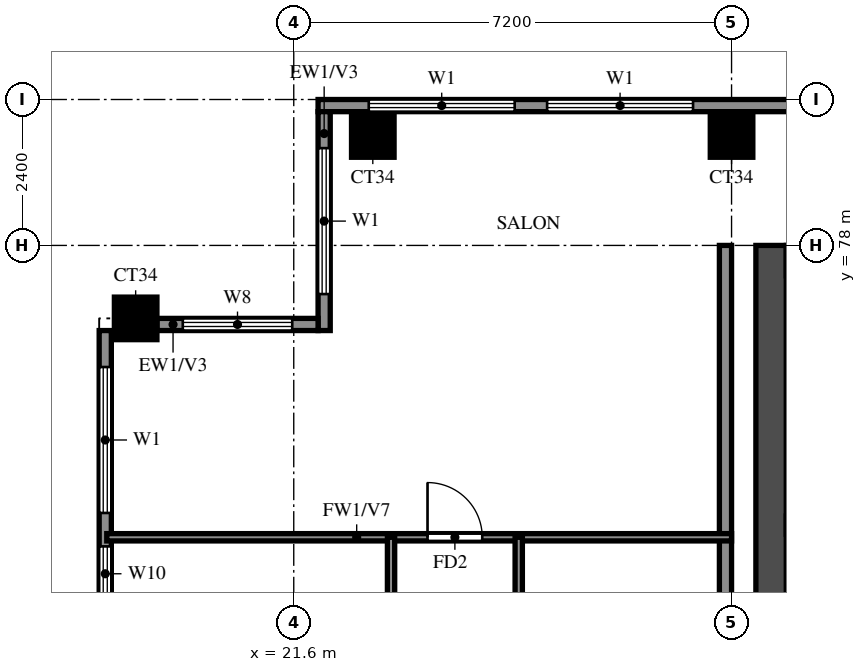
"""IFC4 building model, lengths in metres.
Left out: names, types, materials, properties, quantities, classifications, styles, units other than length and angle.
Written with IfcOpenShell. Run it as: python <this file> out.ifc"""

import sys

from ifc_helpers import new_model, si_unit, direction, frame, frame_2d, origin, origin_2d, place, context, subcontext, project, spatial, rectangle, extrude, source, transform, mapped, element, fill, save


model = new_model("IFC4")
c1 = context("Model", 3, precision=1e-05, world=origin(), true_north=direction((0.0, 1.0)))
c2 = subcontext(c1, "Body", "Model", "MODEL_VIEW")
j1 = project(units=[si_unit("LENGTHUNIT", "METRE"), si_unit("PLANEANGLEUNIT", "RADIAN")], contexts=[c1])
p1 = place(None, origin())
s1 = spatial("IfcSite", under=j1, at=p1, CompositionType="ELEMENT")
p2 = place(p1, origin())
s2 = spatial("IfcBuilding", under=s1, at=p2, CompositionType="ELEMENT")
p3 = place(p2, frame((0.0, 0.0, 222.0)))
s3 = spatial("IfcBuildingStorey", under=s2, at=p3, CompositionType="ELEMENT", Elevation=222.0)
m1 = source(origin(), c2, "Body", "SweptSolid", [
    extrude(rectangle(XDim=0.7, YDim=0.7, at=origin_2d()), origin(), (0.0, 0.0, 1.0), 3.22),
])
for number, where, z_axis, x_axis in (
    (1, (19.0, 76.8, 0.0), (0.0, 0.0, 1.0), (1.0, 0.0, 0.0)),
    (2, (22.9, 79.8, 0.0), (0.0, 0.0, 1.0), (1.0, 0.0, 0.0)),
    (3, (28.8, 79.8, 0.0), (0.0, 0.0, 1.0), (1.0, 0.0, 0.0)),
):
    element("IfcColumn", number, at=place(p3, frame(where, z_axis=z_axis, x_axis=x_axis)), inside=s3, PredefinedType="COLUMN", context=c2, shape_type="MappedRepresentation", body=[
        mapped(m1, transform((0.0, 0.0, 0.0))),
    ])
p4 = place(p3, frame((29.45, 66.15, 0.0), z_axis=(0.0, 0.0, 1.0), x_axis=(0.0, 1.0, 0.0)))
e4 = element("IfcWall", 4, at=p4, inside=s3, PredefinedType="SHEAR", context=c2, shape_type="SweptSolid", body=[
    extrude(rectangle(XDim=11.85, YDim=0.5, at=frame_2d((5.925, 0.0))), origin(), (0.0, 0.0, 1.0), 3.22),
])
p5 = place(p3, frame((78.6, 80.3, 0.0), z_axis=(0.0, 0.0, 1.0), x_axis=(-1.0, 0.0, 0.0)))
e5 = element("IfcWall", 5, at=p5, inside=s3, PredefinedType="SOLIDWALL", context=c2, shape_type="SweptSolid", body=[
    extrude(rectangle(XDim=56.6, YDim=0.2, at=frame_2d((28.3, 0.0))), origin(), (0.0, 0.0, 1.0), 3.22),
])
p6 = place(p5, frame((50.433, 0.0, 0.6)))
e6 = element("IfcOpeningElement", 6, at=p6, cuts=e5, PredefinedType="OPENING", context=c2, shape_type="SweptSolid", body=[
    extrude(rectangle(XDim=2.4, YDim=2.4, at=frame_2d((1.2, 1.2))), frame((0.0, 0.11, 0.0), z_axis=(0.0, -1.0, 0.0), x_axis=(1.0, 0.0, 0.0)), (0.0, 0.0, 1.0), 0.22),
])
p7 = place(p5, frame((53.367, 0.0, 0.6)))
e7 = element("IfcOpeningElement", 7, at=p7, cuts=e5, PredefinedType="OPENING", context=c2, shape_type="SweptSolid", body=[
    extrude(rectangle(XDim=2.4, YDim=2.4, at=frame_2d((1.2, 1.2))), frame((0.0, 0.11, 0.0), z_axis=(0.0, -1.0, 0.0), x_axis=(1.0, 0.0, 0.0)), (0.0, 0.0, 1.0), 0.22),
])
p8 = place(p5, frame((0.767, 0.0, 0.6)))
e8 = element("IfcOpeningElement", 8, at=p8, cuts=e5, PredefinedType="OPENING", context=c2, shape_type="SweptSolid", body=[
    extrude(rectangle(XDim=2.4, YDim=2.4, at=frame_2d((1.2, 1.2))), frame((0.0, 0.11, 0.0), z_axis=(0.0, -1.0, 0.0), x_axis=(1.0, 0.0, 0.0)), (0.0, 0.0, 1.0), 0.22),
])
p9 = place(p5, frame((3.633, 0.0, 0.6)))
e9 = element("IfcOpeningElement", 9, at=p9, cuts=e5, PredefinedType="OPENING", context=c2, shape_type="SweptSolid", body=[
    extrude(rectangle(XDim=2.4, YDim=2.4, at=frame_2d((1.2, 1.2))), frame((0.0, 0.11, 0.0), z_axis=(0.0, -1.0, 0.0), x_axis=(1.0, 0.0, 0.0)), (0.0, 0.0, 1.0), 0.22),
])
p10 = place(p3, frame((22.1, 80.2, 0.0), z_axis=(0.0, 0.0, 1.0), x_axis=(0.0, -1.0, 0.0)))
e10 = element("IfcWall", 10, at=p10, inside=s3, PredefinedType="SOLIDWALL", context=c2, shape_type="SweptSolid", body=[
    extrude(rectangle(XDim=3.6, YDim=0.2, at=frame_2d((1.8, 0.0))), origin(), (0.0, 0.0, 1.0), 3.22),
])
p11 = place(p10, frame((0.6, 0.0, 0.6)))
e11 = element("IfcOpeningElement", 11, at=p11, cuts=e10, PredefinedType="OPENING", context=c2, shape_type="SweptSolid", body=[
    extrude(rectangle(XDim=2.4, YDim=2.4, at=frame_2d((1.2, 1.2))), frame((0.0, 0.11, 0.0), z_axis=(0.0, -1.0, 0.0), x_axis=(1.0, 0.0, 0.0)), (0.0, 0.0, 1.0), 0.22),
])
p12 = place(p3, frame((22.0, 76.7, 0.0), z_axis=(0.0, 0.0, 1.0), x_axis=(-1.0, 0.0, 0.0)))
e12 = element("IfcWall", 12, at=p12, inside=s3, PredefinedType="SOLIDWALL", context=c2, shape_type="SweptSolid", body=[
    extrude(rectangle(XDim=2.65, YDim=0.2, at=frame_2d((1.325, 0.0))), origin(), (0.0, 0.0, 1.0), 3.22),
])
p13 = place(p12, frame((0.425, 0.0, 0.6)))
e13 = element("IfcOpeningElement", 13, at=p13, cuts=e12, PredefinedType="OPENING", context=c2, shape_type="SweptSolid", body=[
    extrude(rectangle(XDim=1.8, YDim=2.4, at=frame_2d((0.9, 1.2))), frame((0.0, 0.11, 0.0), z_axis=(0.0, -1.0, 0.0), x_axis=(1.0, 0.0, 0.0)), (0.0, 0.0, 1.0), 0.22),
])
p14 = place(p3, frame((18.5, 76.6, 0.0), z_axis=(0.0, 0.0, 1.0), x_axis=(0.0, -1.0, 0.0)))
e14 = element("IfcWall", 14, at=p14, inside=s3, PredefinedType="SOLIDWALL", context=c2, shape_type="SweptSolid", body=[
    extrude(rectangle(XDim=33.4, YDim=0.2, at=frame_2d((16.7, 0.0))), origin(), (0.0, 0.0, 1.0), 3.22),
])
p15 = place(p14, frame((7.9, 0.0, 0.0)))
e15 = element("IfcOpeningElement", 15, at=p15, cuts=e14, PredefinedType="OPENING", context=c2, shape_type="SweptSolid", body=[
    extrude(rectangle(XDim=1.8, YDim=2.4, at=frame_2d((0.9, 1.2))), frame((0.0, 0.11, 0.0), z_axis=(0.0, -1.0, 0.0), x_axis=(1.0, 0.0, 0.0)), (0.0, 0.0, 1.0), 0.22),
])
p16 = place(p14, frame((22.3, 0.0, 0.0)))
e16 = element("IfcOpeningElement", 16, at=p16, cuts=e14, PredefinedType="OPENING", context=c2, shape_type="SweptSolid", body=[
    extrude(rectangle(XDim=1.8, YDim=2.4, at=frame_2d((0.9, 1.2))), frame((0.0, 0.11, 0.0), z_axis=(0.0, -1.0, 0.0), x_axis=(1.0, 0.0, 0.0)), (0.0, 0.0, 1.0), 0.22),
])
p17 = place(p14, frame((29.7, 0.0, 0.6)))
e17 = element("IfcOpeningElement", 17, at=p17, cuts=e14, PredefinedType="OPENING", context=c2, shape_type="SweptSolid", body=[
    extrude(rectangle(XDim=2.4, YDim=2.4, at=frame_2d((1.2, 1.2))), frame((0.0, 0.11, 0.0), z_axis=(0.0, -1.0, 0.0), x_axis=(1.0, 0.0, 0.0)), (0.0, 0.0, 1.0), 0.22),
])
p18 = place(p14, frame((26.5, 0.0, 0.6)))
e18 = element("IfcOpeningElement", 18, at=p18, cuts=e14, PredefinedType="OPENING", context=c2, shape_type="SweptSolid", body=[
    extrude(rectangle(XDim=1.8, YDim=2.4, at=frame_2d((0.9, 1.2))), frame((0.0, 0.11, 0.0), z_axis=(0.0, -1.0, 0.0), x_axis=(1.0, 0.0, 0.0)), (0.0, 0.0, 1.0), 0.22),
])
p19 = place(p14, frame((15.4, 0.0, 0.6)))
e19 = element("IfcOpeningElement", 19, at=p19, cuts=e14, PredefinedType="OPENING", context=c2, shape_type="SweptSolid", body=[
    extrude(rectangle(XDim=2.4, YDim=2.4, at=frame_2d((1.2, 1.2))), frame((0.0, 0.11, 0.0), z_axis=(0.0, -1.0, 0.0), x_axis=(1.0, 0.0, 0.0)), (0.0, 0.0, 1.0), 0.22),
])
p20 = place(p14, frame((19.9, 0.0, 0.6)))
e20 = element("IfcOpeningElement", 20, at=p20, cuts=e14, PredefinedType="OPENING", context=c2, shape_type="SweptSolid", body=[
    extrude(rectangle(XDim=1.2, YDim=2.4, at=frame_2d((0.6, 1.2))), frame((0.0, 0.11, 0.0), z_axis=(0.0, -1.0, 0.0), x_axis=(1.0, 0.0, 0.0)), (0.0, 0.0, 1.0), 0.22),
])
p21 = place(p14, frame((12.1, 0.0, 0.6)))
e21 = element("IfcOpeningElement", 21, at=p21, cuts=e14, PredefinedType="OPENING", context=c2, shape_type="SweptSolid", body=[
    extrude(rectangle(XDim=1.8, YDim=2.4, at=frame_2d((0.9, 1.2))), frame((0.0, 0.11, 0.0), z_axis=(0.0, -1.0, 0.0), x_axis=(1.0, 0.0, 0.0)), (0.0, 0.0, 1.0), 0.22),
])
p22 = place(p14, frame((3.55, 0.0, 0.6)))
e22 = element("IfcOpeningElement", 22, at=p22, cuts=e14, PredefinedType="OPENING", context=c2, shape_type="SweptSolid", body=[
    extrude(rectangle(XDim=0.9, YDim=2.4, at=frame_2d((0.45, 1.2))), frame((0.0, 0.11, 0.0), z_axis=(0.0, -1.0, 0.0), x_axis=(1.0, 0.0, 0.0)), (0.0, 0.0, 1.0), 0.22),
])
p23 = place(p14, frame((5.5, 0.0, 0.6)))
e23 = element("IfcOpeningElement", 23, at=p23, cuts=e14, PredefinedType="OPENING", context=c2, shape_type="SweptSolid", body=[
    extrude(rectangle(XDim=1.2, YDim=2.4, at=frame_2d((0.6, 1.2))), frame((0.0, 0.11, 0.0), z_axis=(0.0, -1.0, 0.0), x_axis=(1.0, 0.0, 0.0)), (0.0, 0.0, 1.0), 0.22),
])
p24 = place(p14, frame((0.6, 0.0, 0.6)))
e24 = element("IfcOpeningElement", 24, at=p24, cuts=e14, PredefinedType="OPENING", context=c2, shape_type="SweptSolid", body=[
    extrude(rectangle(XDim=2.4, YDim=2.4, at=frame_2d((1.2, 1.2))), frame((0.0, 0.11, 0.0), z_axis=(0.0, -1.0, 0.0), x_axis=(1.0, 0.0, 0.0)), (0.0, 0.0, 1.0), 0.22),
])
p25 = place(p3, frame((28.7, 62.4, 0.0), z_axis=(0.0, 0.0, 1.0), x_axis=(0.0, 1.0, 0.0)))
e25 = element("IfcWall", 25, at=p25, inside=s3, PredefinedType="SOLIDWALL", context=c2, shape_type="SweptSolid", body=[
    extrude(rectangle(XDim=15.6, YDim=0.2, at=frame_2d((7.8, 0.0))), origin(), (0.0, 0.0, 1.0), 3.22),
])
p26 = place(p3, frame((18.525, 73.2, 0.0), z_axis=(0.0, 0.0, 1.0), x_axis=(1.0, 0.0, 0.0)))
e26 = element("IfcWall", 26, at=p26, inside=s3, PredefinedType="PARTITIONING", context=c2, shape_type="SweptSolid", body=[
    extrude(rectangle(XDim=10.275, YDim=0.12, at=frame_2d((5.138, 0.0))), origin(), (0.0, 0.0, 1.0), 2.32),
])
p27 = place(p26, frame((5.275, 0.0, 0.0)))
e27 = element("IfcOpeningElement", 27, at=p27, cuts=e26, PredefinedType="OPENING", context=c2, shape_type="SweptSolid", body=[
    extrude(rectangle(XDim=0.9, YDim=2.1, at=frame_2d((0.45, 1.05))), frame((0.0, 0.07, 0.0), z_axis=(0.0, -1.0, 0.0), x_axis=(1.0, 0.0, 0.0)), (0.0, 0.0, 1.0), 0.14),
])
p28 = place(p3, frame((23.2, 48.0, 0.0), z_axis=(0.0, 0.0, 1.0), x_axis=(0.0, 1.0, 0.0)))
e28 = element("IfcWall", 28, at=p28, inside=s3, PredefinedType="PARTITIONING", context=c2, shape_type="SweptSolid", body=[
    extrude(rectangle(XDim=25.2, YDim=0.12, at=frame_2d((12.6, 0.0))), origin(), (0.0, 0.0, 1.0), 3.22),
])
p29 = place(p28, frame((1.35, 0.0, 0.0)))
e29 = element("IfcOpeningElement", 29, at=p29, cuts=e28, PredefinedType="OPENING", context=c2, shape_type="SweptSolid", body=[
    extrude(rectangle(XDim=0.9, YDim=2.1, at=frame_2d((0.45, 1.05))), frame((0.0, 0.07, 0.0), z_axis=(0.0, -1.0, 0.0), x_axis=(1.0, 0.0, 0.0)), (0.0, 0.0, 1.0), 0.14),
])
p30 = place(p28, frame((4.95, 0.0, 0.0)))
e30 = element("IfcOpeningElement", 30, at=p30, cuts=e28, PredefinedType="OPENING", context=c2, shape_type="SweptSolid", body=[
    extrude(rectangle(XDim=0.9, YDim=2.1, at=frame_2d((0.45, 1.05))), frame((0.0, 0.07, 0.0), z_axis=(0.0, -1.0, 0.0), x_axis=(1.0, 0.0, 0.0)), (0.0, 0.0, 1.0), 0.14),
])
p31 = place(p28, frame((10.05, 0.0, 0.0)))
e31 = element("IfcOpeningElement", 31, at=p31, cuts=e28, PredefinedType="OPENING", context=c2, shape_type="SweptSolid", body=[
    extrude(rectangle(XDim=1.5, YDim=2.1, at=frame_2d((0.75, 1.05))), frame((0.0, 0.07, 0.0), z_axis=(0.0, -1.0, 0.0), x_axis=(1.0, 0.0, 0.0)), (0.0, 0.0, 1.0), 0.14),
])
p32 = place(p28, frame((15.75, 0.0, 0.0)))
e32 = element("IfcOpeningElement", 32, at=p32, cuts=e28, PredefinedType="OPENING", context=c2, shape_type="SweptSolid", body=[
    extrude(rectangle(XDim=0.9, YDim=2.1, at=frame_2d((0.45, 1.05))), frame((0.0, 0.07, 0.0), z_axis=(0.0, -1.0, 0.0), x_axis=(1.0, 0.0, 0.0)), (0.0, 0.0, 1.0), 0.14),
])
p33 = place(p28, frame((19.35, 0.0, 0.0)))
e33 = element("IfcOpeningElement", 33, at=p33, cuts=e28, PredefinedType="OPENING", context=c2, shape_type="SweptSolid", body=[
    extrude(rectangle(XDim=0.9, YDim=2.1, at=frame_2d((0.45, 1.05))), frame((0.0, 0.07, 0.0), z_axis=(0.0, -1.0, 0.0), x_axis=(1.0, 0.0, 0.0)), (0.0, 0.0, 1.0), 0.14),
])
p34 = place(p28, frame((22.95, 0.0, 0.0)))
e34 = element("IfcOpeningElement", 34, at=p34, cuts=e28, PredefinedType="OPENING", context=c2, shape_type="SweptSolid", body=[
    extrude(rectangle(XDim=0.9, YDim=2.1, at=frame_2d((0.45, 1.05))), frame((0.0, 0.07, 0.0), z_axis=(0.0, -1.0, 0.0), x_axis=(1.0, 0.0, 0.0)), (0.0, 0.0, 1.0), 0.14),
])
p35 = place(p3, frame((25.3, 64.8, 0.0), z_axis=(0.0, 0.0, 1.0), x_axis=(0.0, 1.0, 0.0)))
e35 = element("IfcWall", 35, at=p35, inside=s3, PredefinedType="PARTITIONING", context=c2, shape_type="SweptSolid", body=[
    extrude(rectangle(XDim=8.4, YDim=0.12, at=frame_2d((4.2, 0.0))), origin(), (0.0, 0.0, 1.0), 3.22),
])
p36 = place(p35, frame((4.975, 0.0, 0.0)))
e36 = element("IfcOpeningElement", 36, at=p36, cuts=e35, PredefinedType="OPENING", context=c2, shape_type="SweptSolid", body=[
    extrude(rectangle(XDim=0.9, YDim=2.1, at=frame_2d((0.45, 1.05))), frame((0.0, 0.07, 0.0), z_axis=(0.0, -1.0, 0.0), x_axis=(1.0, 0.0, 0.0)), (0.0, 0.0, 1.0), 0.14),
])
p37 = place(p6, origin())
e37 = element("IfcWindow", 37, at=p37, inside=s3, PartitioningType="DOUBLE_PANEL_VERTICAL", PredefinedType="WINDOW", context=c2, shape_type="SweptSolid", body=[
    extrude(rectangle(XDim=2.4, YDim=2.4, at=frame_2d((1.2, 1.2))), frame((0.0, 0.03, 0.0), z_axis=(0.0, -1.0, 0.0), x_axis=(1.0, 0.0, 0.0)), (0.0, 0.0, 1.0), 0.06),
])
fill(e6, e37)
p38 = place(p7, origin())
e38 = element("IfcWindow", 38, at=p38, inside=s3, PartitioningType="DOUBLE_PANEL_VERTICAL", PredefinedType="WINDOW", context=c2, shape_type="SweptSolid", body=[
    extrude(rectangle(XDim=2.4, YDim=2.4, at=frame_2d((1.2, 1.2))), frame((0.0, 0.03, 0.0), z_axis=(0.0, -1.0, 0.0), x_axis=(1.0, 0.0, 0.0)), (0.0, 0.0, 1.0), 0.06),
])
fill(e7, e38)
p39 = place(p11, origin())
e39 = element("IfcWindow", 39, at=p39, inside=s3, PartitioningType="DOUBLE_PANEL_VERTICAL", PredefinedType="WINDOW", context=c2, shape_type="SweptSolid", body=[
    extrude(rectangle(XDim=2.4, YDim=2.4, at=frame_2d((1.2, 1.2))), frame((0.0, 0.03, 0.0), z_axis=(0.0, -1.0, 0.0), x_axis=(1.0, 0.0, 0.0)), (0.0, 0.0, 1.0), 0.06),
])
fill(e11, e39)
p40 = place(p13, origin())
e40 = element("IfcWindow", 40, at=p40, inside=s3, PartitioningType="DOUBLE_PANEL_VERTICAL", PredefinedType="WINDOW", context=c2, shape_type="SweptSolid", body=[
    extrude(rectangle(XDim=1.8, YDim=2.4, at=frame_2d((0.9, 1.2))), frame((0.0, 0.03, 0.0), z_axis=(0.0, -1.0, 0.0), x_axis=(1.0, 0.0, 0.0)), (0.0, 0.0, 1.0), 0.06),
])
fill(e13, e40)
p41 = place(p22, origin())
e41 = element("IfcWindow", 41, at=p41, inside=s3, PartitioningType="SINGLE_PANEL", PredefinedType="WINDOW", context=c2, shape_type="SweptSolid", body=[
    extrude(rectangle(XDim=0.9, YDim=2.4, at=frame_2d((0.45, 1.2))), frame((0.0, 0.03, 0.0), z_axis=(0.0, -1.0, 0.0), x_axis=(1.0, 0.0, 0.0)), (0.0, 0.0, 1.0), 0.06),
])
fill(e22, e41)
p42 = place(p24, origin())
e42 = element("IfcWindow", 42, at=p42, inside=s3, PartitioningType="DOUBLE_PANEL_VERTICAL", PredefinedType="WINDOW", context=c2, shape_type="SweptSolid", body=[
    extrude(rectangle(XDim=2.4, YDim=2.4, at=frame_2d((1.2, 1.2))), frame((0.0, 0.03, 0.0), z_axis=(0.0, -1.0, 0.0), x_axis=(1.0, 0.0, 0.0)), (0.0, 0.0, 1.0), 0.06),
])
fill(e24, e42)
p43 = place(p27, origin())
e43 = element("IfcDoor", 43, at=p43, inside=s3, OperationType="SINGLE_SWING_RIGHT", PredefinedType="DOOR", context=c2, shape_type="SweptSolid", body=[
    extrude(rectangle(XDim=0.9, YDim=2.1, at=frame_2d((0.45, 1.05))), frame((0.0, 0.025, 0.0), z_axis=(0.0, -1.0, 0.0), x_axis=(1.0, 0.0, 0.0)), (0.0, 0.0, 1.0), 0.05),
])
fill(e27, e43)
save(model, sys.argv[1])
